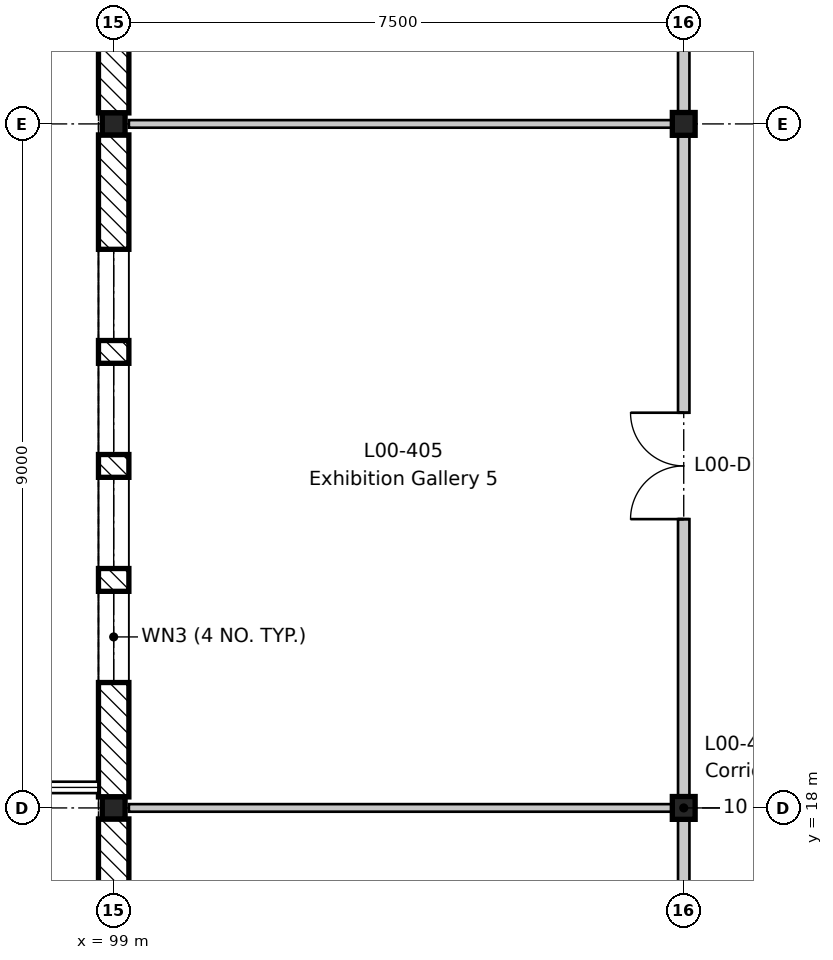
"""IFC4 building model, lengths in metres.
Left out: names, types, materials, properties, quantities, classifications, styles, units other than length and angle.
Written with IfcOpenShell. Run it as: python <this file> out.ifc"""

import sys

from ifc_helpers import new_model, si_unit, direction, frame, frame_2d, origin, origin_2d, place, context, subcontext, project, spatial, rectangle, i_section, extrude, element, fill, save


model = new_model("IFC4")
c1 = context("Model", 3, precision=1e-05, world=origin(), true_north=direction((0.0, 1.0)))
c2 = subcontext(c1, "Body", "Model", "MODEL_VIEW")
j1 = project(units=[si_unit("LENGTHUNIT", "METRE"), si_unit("PLANEANGLEUNIT", "RADIAN")], contexts=[c1])
p1 = place(None, origin())
s1 = spatial("IfcSite", under=j1, at=p1, CompositionType="ELEMENT")
p2 = place(p1, origin())
s2 = spatial("IfcBuilding", under=s1, at=p2, CompositionType="ELEMENT")
p3 = place(p2, origin())
s3 = spatial("IfcBuildingStorey", under=s2, at=p3, CompositionType="ELEMENT", Elevation=0.0)
for number, where, z_axis, x_axis in (
    (1, (99.0, 18.0, -0.6), (0.0, 0.0, 1.0), (1.0, 0.0, 0.0)),
    (2, (99.0, 27.0, -0.6), (0.0, 0.0, 1.0), (1.0, 0.0, 0.0)),
):
    element("IfcColumn", number, at=place(p3, frame(where, z_axis=z_axis, x_axis=x_axis)), inside=s3, PredefinedType="COLUMN", context=c2, shape_type="SweptSolid", body=[
        extrude(i_section(OverallWidth=0.3, OverallDepth=0.29, WebThickness=0.009, FlangeThickness=0.014, FilletRadius=0.027, at=origin_2d()), origin(), (0.0, 0.0, 1.0), 5.8),
    ])
for number, where, z_axis, x_axis in (
    (3, (106.5, 18.0, -0.6), (0.0, 0.0, 1.0), (1.0, 0.0, 0.0)),
    (4, (106.5, 27.0, -0.6), (0.0, 0.0, 1.0), (1.0, 0.0, 0.0)),
):
    element("IfcColumn", number, at=place(p3, frame(where, z_axis=z_axis, x_axis=x_axis)), inside=s3, PredefinedType="COLUMN", context=c2, shape_type="SweptSolid", body=[
        extrude(i_section(OverallWidth=0.3, OverallDepth=0.3, WebThickness=0.011, FlangeThickness=0.019, FilletRadius=0.027, at=origin_2d()), origin(), (0.0, 0.0, 1.0), 5.8),
    ])
p4 = place(p3, frame((99.0, 9.145, 0.0), z_axis=(0.0, 0.0, 1.0), x_axis=(0.0, 1.0, 0.0)))
e5 = element("IfcWall", 5, at=p4, inside=s3, PredefinedType="STANDARD", context=c2, shape_type="SweptSolid", body=[
    extrude(rectangle(XDim=8.71, YDim=0.4, at=frame_2d((4.355, 0.0))), origin(), (0.0, 0.0, 1.0), 4.8),
])
p5 = place(p4, frame((1.505, 0.0, 0.6)))
e6 = element("IfcOpeningElement", 6, at=p5, cuts=e5, PredefinedType="OPENING", context=c2, shape_type="SweptSolid", body=[
    extrude(rectangle(XDim=1.2, YDim=3.9, at=frame_2d((0.6, 1.95))), frame((0.0, 0.21, 0.0), z_axis=(0.0, -1.0, 0.0), x_axis=(1.0, 0.0, 0.0)), (0.0, 0.0, 1.0), 0.42),
])
p6 = place(p4, frame((3.005, 0.0, 0.6)))
e7 = element("IfcOpeningElement", 7, at=p6, cuts=e5, PredefinedType="OPENING", context=c2, shape_type="SweptSolid", body=[
    extrude(rectangle(XDim=1.2, YDim=3.9, at=frame_2d((0.6, 1.95))), frame((0.0, 0.21, 0.0), z_axis=(0.0, -1.0, 0.0), x_axis=(1.0, 0.0, 0.0)), (0.0, 0.0, 1.0), 0.42),
])
p7 = place(p4, frame((4.505, 0.0, 0.6)))
e8 = element("IfcOpeningElement", 8, at=p7, cuts=e5, PredefinedType="OPENING", context=c2, shape_type="SweptSolid", body=[
    extrude(rectangle(XDim=1.2, YDim=3.9, at=frame_2d((0.6, 1.95))), frame((0.0, 0.21, 0.0), z_axis=(0.0, -1.0, 0.0), x_axis=(1.0, 0.0, 0.0)), (0.0, 0.0, 1.0), 0.42),
])
p8 = place(p4, frame((6.005, 0.0, 0.6)))
e9 = element("IfcOpeningElement", 9, at=p8, cuts=e5, PredefinedType="OPENING", context=c2, shape_type="SweptSolid", body=[
    extrude(rectangle(XDim=1.2, YDim=3.9, at=frame_2d((0.6, 1.95))), frame((0.0, 0.21, 0.0), z_axis=(0.0, -1.0, 0.0), x_axis=(1.0, 0.0, 0.0)), (0.0, 0.0, 1.0), 0.42),
])
p9 = place(p3, frame((99.0, 18.145, 0.0), z_axis=(0.0, 0.0, 1.0), x_axis=(0.0, 1.0, 0.0)))
e10 = element("IfcWall", 10, at=p9, inside=s3, PredefinedType="STANDARD", context=c2, shape_type="SweptSolid", body=[
    extrude(rectangle(XDim=8.71, YDim=0.4, at=frame_2d((4.355, 0.0))), origin(), (0.0, 0.0, 1.0), 4.8),
])
p10 = place(p9, frame((1.505, 0.0, 0.6)))
e11 = element("IfcOpeningElement", 11, at=p10, cuts=e10, PredefinedType="OPENING", context=c2, shape_type="SweptSolid", body=[
    extrude(rectangle(XDim=1.2, YDim=3.9, at=frame_2d((0.6, 1.95))), frame((0.0, 0.21, 0.0), z_axis=(0.0, -1.0, 0.0), x_axis=(1.0, 0.0, 0.0)), (0.0, 0.0, 1.0), 0.42),
])
p11 = place(p9, frame((3.005, 0.0, 0.6)))
e12 = element("IfcOpeningElement", 12, at=p11, cuts=e10, PredefinedType="OPENING", context=c2, shape_type="SweptSolid", body=[
    extrude(rectangle(XDim=1.2, YDim=3.9, at=frame_2d((0.6, 1.95))), frame((0.0, 0.21, 0.0), z_axis=(0.0, -1.0, 0.0), x_axis=(1.0, 0.0, 0.0)), (0.0, 0.0, 1.0), 0.42),
])
p12 = place(p9, frame((4.505, 0.0, 0.6)))
e13 = element("IfcOpeningElement", 13, at=p12, cuts=e10, PredefinedType="OPENING", context=c2, shape_type="SweptSolid", body=[
    extrude(rectangle(XDim=1.2, YDim=3.9, at=frame_2d((0.6, 1.95))), frame((0.0, 0.21, 0.0), z_axis=(0.0, -1.0, 0.0), x_axis=(1.0, 0.0, 0.0)), (0.0, 0.0, 1.0), 0.42),
])
p13 = place(p9, frame((6.005, 0.0, 0.6)))
e14 = element("IfcOpeningElement", 14, at=p13, cuts=e10, PredefinedType="OPENING", context=c2, shape_type="SweptSolid", body=[
    extrude(rectangle(XDim=1.2, YDim=3.9, at=frame_2d((0.6, 1.95))), frame((0.0, 0.21, 0.0), z_axis=(0.0, -1.0, 0.0), x_axis=(1.0, 0.0, 0.0)), (0.0, 0.0, 1.0), 0.42),
])
p14 = place(p3, frame((99.0, 27.145, 0.0), z_axis=(0.0, 0.0, 1.0), x_axis=(0.0, 1.0, 0.0)))
e15 = element("IfcWall", 15, at=p14, inside=s3, PredefinedType="STANDARD", context=c2, shape_type="SweptSolid", body=[
    extrude(rectangle(XDim=8.71, YDim=0.4, at=frame_2d((4.355, 0.0))), origin(), (0.0, 0.0, 1.0), 4.8),
])
p15 = place(p14, frame((1.505, 0.0, 0.6)))
e16 = element("IfcOpeningElement", 16, at=p15, cuts=e15, PredefinedType="OPENING", context=c2, shape_type="SweptSolid", body=[
    extrude(rectangle(XDim=1.2, YDim=3.9, at=frame_2d((0.6, 1.95))), frame((0.0, 0.21, 0.0), z_axis=(0.0, -1.0, 0.0), x_axis=(1.0, 0.0, 0.0)), (0.0, 0.0, 1.0), 0.42),
])
p16 = place(p14, frame((3.005, 0.0, 0.6)))
e17 = element("IfcOpeningElement", 17, at=p16, cuts=e15, PredefinedType="OPENING", context=c2, shape_type="SweptSolid", body=[
    extrude(rectangle(XDim=1.2, YDim=3.9, at=frame_2d((0.6, 1.95))), frame((0.0, 0.21, 0.0), z_axis=(0.0, -1.0, 0.0), x_axis=(1.0, 0.0, 0.0)), (0.0, 0.0, 1.0), 0.42),
])
p17 = place(p14, frame((4.505, 0.0, 0.6)))
e18 = element("IfcOpeningElement", 18, at=p17, cuts=e15, PredefinedType="OPENING", context=c2, shape_type="SweptSolid", body=[
    extrude(rectangle(XDim=1.2, YDim=3.9, at=frame_2d((0.6, 1.95))), frame((0.0, 0.21, 0.0), z_axis=(0.0, -1.0, 0.0), x_axis=(1.0, 0.0, 0.0)), (0.0, 0.0, 1.0), 0.42),
])
p18 = place(p14, frame((6.005, 0.0, 0.6)))
e19 = element("IfcOpeningElement", 19, at=p18, cuts=e15, PredefinedType="OPENING", context=c2, shape_type="SweptSolid", body=[
    extrude(rectangle(XDim=1.2, YDim=3.9, at=frame_2d((0.6, 1.95))), frame((0.0, 0.21, 0.0), z_axis=(0.0, -1.0, 0.0), x_axis=(1.0, 0.0, 0.0)), (0.0, 0.0, 1.0), 0.42),
])
for number, where, z_axis, x_axis in (
    (20, (99.2, 18.0, 0.0), (0.0, 0.0, 1.0), (1.0, 0.0, 0.0)),
    (21, (99.2, 27.0, 0.0), (0.0, 0.0, 1.0), (1.0, 0.0, 0.0)),
):
    element("IfcWall", number, at=place(p3, frame(where, z_axis=z_axis, x_axis=x_axis)), inside=s3, PredefinedType="PARTITIONING", context=c2, shape_type="SweptSolid", body=[
        extrude(rectangle(XDim=7.225, YDim=0.1, at=frame_2d((3.613, 0.0))), origin(), (0.0, 0.0, 1.0), 4.85),
    ])
p19 = place(p3, frame((106.5, 9.0, 0.0), z_axis=(0.0, 0.0, 1.0), x_axis=(0.0, 1.0, 0.0)))
e22 = element("IfcWall", 22, at=p19, inside=s3, PredefinedType="PARTITIONING", context=c2, shape_type="SweptSolid", body=[
    extrude(rectangle(XDim=44.8, YDim=0.15, at=frame_2d((22.4, 0.0))), origin(), (0.0, 0.0, 1.0), 4.68),
])
p20 = place(p19, frame((3.8, 0.0, 0.0)))
e23 = element("IfcOpeningElement", 23, at=p20, cuts=e22, PredefinedType="OPENING", context=c2, shape_type="SweptSolid", body=[
    extrude(rectangle(XDim=1.4, YDim=2.1, at=frame_2d((0.7, 1.05))), frame((0.0, 0.085, 0.0), z_axis=(0.0, -1.0, 0.0), x_axis=(1.0, 0.0, 0.0)), (0.0, 0.0, 1.0), 0.17),
])
p21 = place(p19, frame((12.8, 0.0, 0.0)))
e24 = element("IfcOpeningElement", 24, at=p21, cuts=e22, PredefinedType="OPENING", context=c2, shape_type="SweptSolid", body=[
    extrude(rectangle(XDim=1.4, YDim=2.1, at=frame_2d((0.7, 1.05))), frame((0.0, 0.085, 0.0), z_axis=(0.0, -1.0, 0.0), x_axis=(1.0, 0.0, 0.0)), (0.0, 0.0, 1.0), 0.17),
])
p22 = place(p19, frame((21.8, 0.0, 0.0)))
e25 = element("IfcOpeningElement", 25, at=p22, cuts=e22, PredefinedType="OPENING", context=c2, shape_type="SweptSolid", body=[
    extrude(rectangle(XDim=1.4, YDim=2.1, at=frame_2d((0.7, 1.05))), frame((0.0, 0.085, 0.0), z_axis=(0.0, -1.0, 0.0), x_axis=(1.0, 0.0, 0.0)), (0.0, 0.0, 1.0), 0.17),
])
p23 = place(p19, frame((30.8, 0.0, 0.0)))
e26 = element("IfcOpeningElement", 26, at=p23, cuts=e22, PredefinedType="OPENING", context=c2, shape_type="SweptSolid", body=[
    extrude(rectangle(XDim=1.4, YDim=2.1, at=frame_2d((0.7, 1.05))), frame((0.0, 0.085, 0.0), z_axis=(0.0, -1.0, 0.0), x_axis=(1.0, 0.0, 0.0)), (0.0, 0.0, 1.0), 0.17),
])
p24 = place(p19, frame((39.8, 0.0, 0.0)))
e27 = element("IfcOpeningElement", 27, at=p24, cuts=e22, PredefinedType="OPENING", context=c2, shape_type="SweptSolid", body=[
    extrude(rectangle(XDim=1.4, YDim=2.1, at=frame_2d((0.7, 1.05))), frame((0.0, 0.085, 0.0), z_axis=(0.0, -1.0, 0.0), x_axis=(1.0, 0.0, 0.0)), (0.0, 0.0, 1.0), 0.17),
])
p25 = place(p10, origin())
e28 = element("IfcWindow", 28, at=p25, inside=s3, PartitioningType="SINGLE_PANEL", PredefinedType="WINDOW", context=c2, shape_type="SweptSolid", body=[
    extrude(rectangle(XDim=1.2, YDim=3.9, at=frame_2d((0.6, 1.95))), frame((0.0, 0.03, 0.0), z_axis=(0.0, -1.0, 0.0), x_axis=(1.0, 0.0, 0.0)), (0.0, 0.0, 1.0), 0.06),
])
fill(e11, e28)
p26 = place(p11, origin())
e29 = element("IfcWindow", 29, at=p26, inside=s3, PartitioningType="SINGLE_PANEL", PredefinedType="WINDOW", context=c2, shape_type="SweptSolid", body=[
    extrude(rectangle(XDim=1.2, YDim=3.9, at=frame_2d((0.6, 1.95))), frame((0.0, 0.03, 0.0), z_axis=(0.0, -1.0, 0.0), x_axis=(1.0, 0.0, 0.0)), (0.0, 0.0, 1.0), 0.06),
])
fill(e12, e29)
p27 = place(p12, origin())
e30 = element("IfcWindow", 30, at=p27, inside=s3, PartitioningType="SINGLE_PANEL", PredefinedType="WINDOW", context=c2, shape_type="SweptSolid", body=[
    extrude(rectangle(XDim=1.2, YDim=3.9, at=frame_2d((0.6, 1.95))), frame((0.0, 0.03, 0.0), z_axis=(0.0, -1.0, 0.0), x_axis=(1.0, 0.0, 0.0)), (0.0, 0.0, 1.0), 0.06),
])
fill(e13, e30)
p28 = place(p13, origin())
e31 = element("IfcWindow", 31, at=p28, inside=s3, PartitioningType="SINGLE_PANEL", PredefinedType="WINDOW", context=c2, shape_type="SweptSolid", body=[
    extrude(rectangle(XDim=1.2, YDim=3.9, at=frame_2d((0.6, 1.95))), frame((0.0, 0.03, 0.0), z_axis=(0.0, -1.0, 0.0), x_axis=(1.0, 0.0, 0.0)), (0.0, 0.0, 1.0), 0.06),
])
fill(e14, e31)
p29 = place(p21, origin())
e32 = element("IfcDoor", 32, at=p29, inside=s3, OperationType="DOUBLE_DOOR_SINGLE_SWING", PredefinedType="DOOR", context=c2, shape_type="SweptSolid", body=[
    extrude(rectangle(XDim=1.4, YDim=2.1, at=frame_2d((0.7, 1.05))), frame((0.0, 0.025, 0.0), z_axis=(0.0, -1.0, 0.0), x_axis=(1.0, 0.0, 0.0)), (0.0, 0.0, 1.0), 0.05),
])
fill(e24, e32)
save(model, sys.argv[1])
